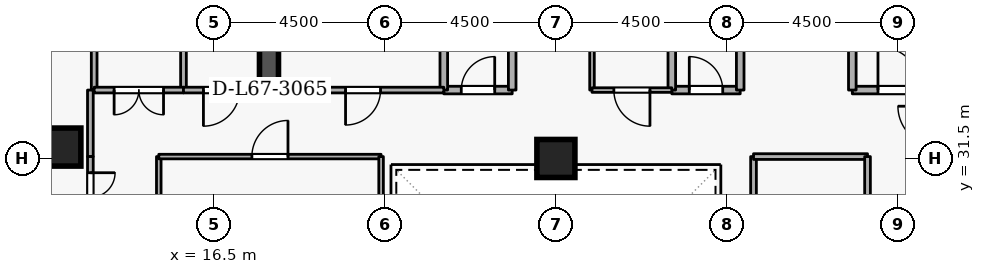
"""IFC4 building model, lengths in metres.
Left out: names, types, materials, properties, quantities, classifications, styles, units other than length and angle.
Written with IfcOpenShell. Run it as: python <this file> out.ifc"""

import sys

from ifc_helpers import new_model, si_unit, direction, frame, frame_2d, origin, origin_2d, place, context, subcontext, project, spatial, rectangle, extrude, element, fill, save


model = new_model("IFC4")
c1 = context("Model", 3, precision=1e-05, world=origin(), true_north=direction((0.0, 1.0)))
c2 = subcontext(c1, "Body", "Model", "MODEL_VIEW")
j1 = project(units=[si_unit("LENGTHUNIT", "METRE"), si_unit("PLANEANGLEUNIT", "RADIAN")], contexts=[c1])
p1 = place(None, origin())
s1 = spatial("IfcSite", under=j1, at=p1, CompositionType="ELEMENT")
p2 = place(p1, origin())
s2 = spatial("IfcBuilding", under=s1, at=p2, CompositionType="ELEMENT")
p3 = place(p2, frame((0.0, 0.0, 251.1)))
s3 = spatial("IfcBuildingStorey", under=s2, at=p3, CompositionType="ELEMENT", Elevation=251.1)
p4 = place(p3, frame((17.95, 33.1, 0.0), z_axis=(0.0, 0.0, 1.0), x_axis=(0.0, 1.0, 0.0)))
e1 = element("IfcWall", 1, at=p4, inside=s3, PredefinedType="SHEAR", context=c2, shape_type="SweptSolid", body=[
    extrude(rectangle(XDim=5.8, YDim=0.5, at=frame_2d((2.9, 0.0))), origin(), (0.0, 0.0, 1.0), 3.6),
])
for number, where, z_axis, x_axis in (
    (2, (12.5, 31.8, 0.0), (0.0, 0.0, 1.0), (1.0, 0.0, 0.0)),
    (3, (25.5, 31.5, 0.0), (0.0, 0.0, 1.0), (1.0, 0.0, 0.0)),
):
    element("IfcColumn", number, at=place(p3, frame(where, z_axis=z_axis, x_axis=x_axis)), inside=s3, PredefinedType="COLUMN", context=c2, shape_type="SweptSolid", body=[
        extrude(rectangle(XDim=1.0, YDim=1.0, at=origin_2d()), origin(), (0.0, 0.0, 1.0), 3.6),
    ])
p5 = place(p3, frame((33.3, 33.3, 0.0), z_axis=(0.0, 0.0, 1.0), x_axis=(1.0, 0.0, 0.0)))
e4 = element("IfcWall", 4, at=p5, inside=s3, PredefinedType="STANDARD", context=c2, shape_type="SweptSolid", body=[
    extrude(rectangle(XDim=2.5, YDim=0.2, at=frame_2d((1.25, 0.0))), origin(), (0.0, 0.0, 1.0), 3.32),
])
p6 = place(p5, frame((0.675, 0.0, 0.0)))
e5 = element("IfcOpeningElement", 5, at=p6, cuts=e4, PredefinedType="OPENING", context=c2, shape_type="SweptSolid", body=[
    extrude(rectangle(XDim=1.15, YDim=2.1, at=frame_2d((0.575, 1.05))), frame((0.0, 0.11, 0.0), z_axis=(0.0, -1.0, 0.0), x_axis=(1.0, 0.0, 0.0)), (0.0, 0.0, 1.0), 0.22),
])
p7 = place(p3, frame((33.3, 35.6, 0.0), z_axis=(0.0, 0.0, 1.0), x_axis=(0.0, -1.0, 0.0)))
e6 = element("IfcWall", 6, at=p7, inside=s3, PredefinedType="STANDARD", context=c2, shape_type="SweptSolid", body=[
    extrude(rectangle(XDim=2.3, YDim=0.2, at=frame_2d((1.15, 0.0))), origin(), (0.0, 0.0, 1.0), 2.525),
])
p8 = place(p3, frame((22.55, 33.3, 0.0), z_axis=(0.0, 0.0, 1.0), x_axis=(1.0, 0.0, 0.0)))
e7 = element("IfcWall", 7, at=p8, inside=s3, PredefinedType="STANDARD", context=c2, shape_type="SweptSolid", body=[
    extrude(rectangle(XDim=1.8, YDim=0.2, at=frame_2d((0.9, 0.0))), origin(), (0.0, 0.0, 1.0), 3.32),
])
p9 = place(p8, frame((0.46, 0.0, 0.0)))
e8 = element("IfcOpeningElement", 8, at=p9, cuts=e7, PredefinedType="OPENING", context=c2, shape_type="SweptSolid", body=[
    extrude(rectangle(XDim=0.88, YDim=2.04, at=frame_2d((0.44, 1.02))), frame((0.0, 0.11, 0.0), z_axis=(0.0, -1.0, 0.0), x_axis=(1.0, 0.0, 0.0)), (0.0, 0.0, 1.0), 0.22),
])
for number, where, z_axis, x_axis in (
    (9, (24.35, 33.3, 0.0), (0.0, 0.0, 1.0), (0.0, 1.0, 0.0)),
    (10, (22.55, 35.35, 0.0), (0.0, 0.0, 1.0), (0.0, -1.0, 0.0)),
):
    element("IfcWall", number, at=place(p3, frame(where, z_axis=z_axis, x_axis=x_axis)), inside=s3, PredefinedType="STANDARD", context=c2, shape_type="SweptSolid", body=[
        extrude(rectangle(XDim=2.05, YDim=0.2, at=frame_2d((1.025, 0.0))), origin(), (0.0, 0.0, 1.0), 3.32),
    ])
p10 = place(p3, frame((28.55, 33.3, 0.0), z_axis=(0.0, 0.0, 1.0), x_axis=(1.0, 0.0, 0.0)))
e11 = element("IfcWall", 11, at=p10, inside=s3, PredefinedType="STANDARD", context=c2, shape_type="SweptSolid", body=[
    extrude(rectangle(XDim=1.8, YDim=0.2, at=frame_2d((0.9, 0.0))), origin(), (0.0, 0.0, 1.0), 3.32),
])
p11 = place(p10, frame((0.46, 0.0, 0.0)))
e12 = element("IfcOpeningElement", 12, at=p11, cuts=e11, PredefinedType="OPENING", context=c2, shape_type="SweptSolid", body=[
    extrude(rectangle(XDim=0.88, YDim=2.04, at=frame_2d((0.44, 1.02))), frame((0.0, 0.11, 0.0), z_axis=(0.0, -1.0, 0.0), x_axis=(1.0, 0.0, 0.0)), (0.0, 0.0, 1.0), 0.22),
])
for number, where, z_axis, x_axis in (
    (13, (30.35, 33.3, 0.0), (0.0, 0.0, 1.0), (0.0, 1.0, 0.0)),
    (14, (28.55, 35.35, 0.0), (0.0, 0.0, 1.0), (0.0, -1.0, 0.0)),
):
    element("IfcWall", number, at=place(p3, frame(where, z_axis=z_axis, x_axis=x_axis)), inside=s3, PredefinedType="STANDARD", context=c2, shape_type="SweptSolid", body=[
        extrude(rectangle(XDim=2.05, YDim=0.2, at=frame_2d((1.025, 0.0))), origin(), (0.0, 0.0, 1.0), 3.32),
    ])
p12 = place(p3, frame((22.55, 33.3, 0.0), z_axis=(0.0, 0.0, 1.0), x_axis=(-1.0, 0.0, 0.0)))
e15 = element("IfcWall", 15, at=p12, inside=s3, PredefinedType="PARTITIONING", context=c2, shape_type="SweptSolid", body=[
    extrude(rectangle(XDim=4.25, YDim=0.15, at=frame_2d((2.125, 0.0))), origin(), (0.0, 0.0, 1.0), 3.32),
])
p13 = place(p12, frame((1.665, 0.0, 0.0)))
e16 = element("IfcOpeningElement", 16, at=p13, cuts=e15, PredefinedType="OPENING", context=c2, shape_type="SweptSolid", body=[
    extrude(rectangle(XDim=0.92, YDim=2.08, at=frame_2d((0.46, 1.04))), frame((0.0, 0.085, 0.0), z_axis=(0.0, -1.0, 0.0), x_axis=(1.0, 0.0, 0.0)), (0.0, 0.0, 1.0), 0.17),
])
p14 = place(p3, frame((26.45, 33.3, 0.0), z_axis=(0.0, 0.0, 1.0), x_axis=(0.0, 1.0, 0.0)))
e17 = element("IfcWall", 17, at=p14, inside=s3, PredefinedType="PARTITIONING", context=c2, shape_type="SweptSolid", body=[
    extrude(rectangle(XDim=2.05, YDim=0.12, at=frame_2d((1.025, 0.0))), origin(), (0.0, 0.0, 1.0), 3.32),
])
p15 = place(p3, frame((28.55, 33.3, 0.0), z_axis=(0.0, 0.0, 1.0), x_axis=(-1.0, 0.0, 0.0)))
e18 = element("IfcWall", 18, at=p15, inside=s3, PredefinedType="PARTITIONING", context=c2, shape_type="SweptSolid", body=[
    extrude(rectangle(XDim=2.1, YDim=0.12, at=frame_2d((1.05, 0.0))), origin(), (0.0, 0.0, 1.0), 3.32),
])
p16 = place(p15, frame((0.575, 0.0, 0.0)))
e19 = element("IfcOpeningElement", 19, at=p16, cuts=e18, PredefinedType="OPENING", context=c2, shape_type="SweptSolid", body=[
    extrude(rectangle(XDim=0.95, YDim=2.1, at=frame_2d((0.475, 1.05))), frame((0.0, 0.07, 0.0), z_axis=(0.0, -1.0, 0.0), x_axis=(1.0, 0.0, 0.0)), (0.0, 0.0, 1.0), 0.14),
])
for number, where, z_axis, x_axis in (
    (20, (13.35, 33.3, 0.0), (0.0, 0.0, 1.0), (0.0, 1.0, 0.0)),
    (21, (15.7, 44.72, 0.0), (0.0, 0.0, 1.0), (0.0, -1.0, 0.0)),
):
    element("IfcWall", number, at=place(p3, frame(where, z_axis=z_axis, x_axis=x_axis)), inside=s3, PredefinedType="PARTITIONING", context=c2, shape_type="SweptSolid", body=[
        extrude(rectangle(XDim=11.42, YDim=0.15, at=frame_2d((5.71, 0.0))), origin(), (0.0, 0.0, 1.0), 3.32),
    ])
p17 = place(p3, frame((15.7, 33.3, 0.0), z_axis=(0.0, 0.0, 1.0), x_axis=(-1.0, 0.0, 0.0)))
e22 = element("IfcWall", 22, at=p17, inside=s3, PredefinedType="PARTITIONING", context=c2, shape_type="SweptSolid", body=[
    extrude(rectangle(XDim=2.35, YDim=0.15, at=frame_2d((1.175, 0.0))), origin(), (0.0, 0.0, 1.0), 3.32),
])
p18 = place(p17, frame((0.525, 0.0, 0.0)))
e23 = element("IfcOpeningElement", 23, at=p18, cuts=e22, PredefinedType="OPENING", context=c2, shape_type="SweptSolid", body=[
    extrude(rectangle(XDim=1.3, YDim=2.12, at=frame_2d((0.65, 1.06))), frame((0.0, 0.085, 0.0), z_axis=(0.0, -1.0, 0.0), x_axis=(1.0, 0.0, 0.0)), (0.0, 0.0, 1.0), 0.17),
])
p19 = place(p3, frame((17.7, 33.3, 0.0), z_axis=(0.0, 0.0, 1.0), x_axis=(-1.0, 0.0, 0.0)))
e24 = element("IfcWall", 24, at=p19, inside=s3, PredefinedType="PARTITIONING", context=c2, shape_type="SweptSolid", body=[
    extrude(rectangle(XDim=2.0, YDim=0.15, at=frame_2d((1.0, 0.0))), origin(), (0.0, 0.0, 1.0), 3.32),
])
p20 = place(p19, frame((0.525, 0.0, 0.0)))
e25 = element("IfcOpeningElement", 25, at=p20, cuts=e24, PredefinedType="OPENING", context=c2, shape_type="SweptSolid", body=[
    extrude(rectangle(XDim=0.95, YDim=2.1, at=frame_2d((0.475, 1.05))), frame((0.0, 0.085, 0.0), z_axis=(0.0, -1.0, 0.0), x_axis=(1.0, 0.0, 0.0)), (0.0, 0.0, 1.0), 0.17),
])
p21 = place(p3, frame((13.25, 33.3, 0.0), z_axis=(0.0, 0.0, 1.0), x_axis=(0.0, -1.0, 0.0)))
e26 = element("IfcWall", 26, at=p21, inside=s3, PredefinedType="PARTITIONING", context=c2, shape_type="SweptSolid", body=[
    extrude(rectangle(XDim=1.75, YDim=0.15, at=frame_2d((0.875, 0.0))), origin(), (0.0, 0.0, 1.0), 3.32),
])
p22 = place(p3, frame((13.25, 31.55, 0.0), z_axis=(0.0, 0.0, 1.0), x_axis=(0.0, -1.0, 0.0)))
e27 = element("IfcWall", 27, at=p22, inside=s3, PredefinedType="PARTITIONING", context=c2, shape_type="SweptSolid", body=[
    extrude(rectangle(XDim=2.15, YDim=0.15, at=frame_2d((1.075, 0.0))), origin(), (0.0, 0.0, 1.0), 3.32),
])
p23 = place(p22, frame((0.425, 0.0, 0.0)))
e28 = element("IfcOpeningElement", 28, at=p23, cuts=e27, PredefinedType="OPENING", context=c2, shape_type="SweptSolid", body=[
    extrude(rectangle(XDim=1.3, YDim=2.12, at=frame_2d((0.65, 1.06))), frame((0.0, 0.085, 0.0), z_axis=(0.0, -1.0, 0.0), x_axis=(1.0, 0.0, 0.0)), (0.0, 0.0, 1.0), 0.17),
])
p24 = place(p3, frame((15.05, 26.2, 0.0), z_axis=(0.0, 0.0, 1.0), x_axis=(0.0, 1.0, 0.0)))
e29 = element("IfcWall", 29, at=p24, inside=s3, PredefinedType="PARTITIONING", context=c2, shape_type="SweptSolid", body=[
    extrude(rectangle(XDim=5.35, YDim=0.12, at=frame_2d((2.675, 0.0))), origin(), (0.0, 0.0, 1.0), 3.32),
])
p25 = place(p3, frame((15.05, 31.55, 0.0), z_axis=(0.0, 0.0, 1.0), x_axis=(1.0, 0.0, 0.0)))
e30 = element("IfcWall", 30, at=p25, inside=s3, PredefinedType="PARTITIONING", context=c2, shape_type="SweptSolid", body=[
    extrude(rectangle(XDim=5.85, YDim=0.12, at=frame_2d((2.925, 0.0))), origin(), (0.0, 0.0, 1.0), 3.32),
])
p26 = place(p25, frame((2.45, 0.0, 0.0)))
e31 = element("IfcOpeningElement", 31, at=p26, cuts=e30, PredefinedType="OPENING", context=c2, shape_type="SweptSolid", body=[
    extrude(rectangle(XDim=0.95, YDim=2.1, at=frame_2d((0.475, 1.05))), frame((0.0, 0.07, 0.0), z_axis=(0.0, -1.0, 0.0), x_axis=(1.0, 0.0, 0.0)), (0.0, 0.0, 1.0), 0.14),
])
p27 = place(p3, frame((20.9, 31.55, 0.0), z_axis=(0.0, 0.0, 1.0), x_axis=(0.0, -1.0, 0.0)))
e32 = element("IfcWall", 32, at=p27, inside=s3, PredefinedType="PARTITIONING", context=c2, shape_type="SweptSolid", body=[
    extrude(rectangle(XDim=5.35, YDim=0.12, at=frame_2d((2.675, 0.0))), origin(), (0.0, 0.0, 1.0), 3.32),
])
p28 = place(p3, frame((30.7, 27.55, 0.0), z_axis=(0.0, 0.0, 1.0), x_axis=(0.0, 1.0, 0.0)))
e33 = element("IfcWall", 33, at=p28, inside=s3, PredefinedType="PARTITIONING", context=c2, shape_type="SweptSolid", body=[
    extrude(rectangle(XDim=4.0, YDim=0.15, at=frame_2d((2.0, 0.0))), origin(), (0.0, 0.0, 1.0), 3.32),
])
p29 = place(p3, frame((30.7, 31.55, 0.0), z_axis=(0.0, 0.0, 1.0), x_axis=(1.0, 0.0, 0.0)))
e34 = element("IfcWall", 34, at=p29, inside=s3, PredefinedType="PARTITIONING", context=c2, shape_type="SweptSolid", body=[
    extrude(rectangle(XDim=3.0, YDim=0.15, at=frame_2d((1.5, 0.0))), origin(), (0.0, 0.0, 1.0), 3.32),
])
p30 = place(p3, frame((33.7, 31.55, 0.0), z_axis=(0.0, 0.0, 1.0), x_axis=(0.0, -1.0, 0.0)))
e35 = element("IfcWall", 35, at=p30, inside=s3, PredefinedType="PARTITIONING", context=c2, shape_type="SweptSolid", body=[
    extrude(rectangle(XDim=4.0, YDim=0.15, at=frame_2d((2.0, 0.0))), origin(), (0.0, 0.0, 1.0), 3.32),
])
p31 = place(p30, frame((1.35, 0.0, 0.0)))
e36 = element("IfcOpeningElement", 36, at=p31, cuts=e35, PredefinedType="OPENING", context=c2, shape_type="SweptSolid", body=[
    extrude(rectangle(XDim=1.3, YDim=2.12, at=frame_2d((0.65, 1.06))), frame((0.0, 0.085, 0.0), z_axis=(0.0, -1.0, 0.0), x_axis=(1.0, 0.0, 0.0)), (0.0, 0.0, 1.0), 0.17),
])
p32 = place(p6, origin())
e37 = element("IfcDoor", 37, at=p32, inside=s3, OperationType="SINGLE_SWING_LEFT", PredefinedType="DOOR", context=c2, shape_type="SweptSolid", body=[
    extrude(rectangle(XDim=1.15, YDim=2.1, at=frame_2d((0.575, 1.05))), frame((0.0, 0.025, 0.0), z_axis=(0.0, -1.0, 0.0), x_axis=(1.0, 0.0, 0.0)), (0.0, 0.0, 1.0), 0.05),
])
fill(e5, e37)
p33 = place(p9, origin())
e38 = element("IfcDoor", 38, at=p33, inside=s3, OperationType="SINGLE_SWING_RIGHT", PredefinedType="DOOR", context=c2, shape_type="SweptSolid", body=[
    extrude(rectangle(XDim=0.88, YDim=2.04, at=frame_2d((0.44, 1.02))), frame((0.0, 0.025, 0.0), z_axis=(0.0, -1.0, 0.0), x_axis=(1.0, 0.0, 0.0)), (0.0, 0.0, 1.0), 0.05),
])
fill(e8, e38)
p34 = place(p11, origin())
e39 = element("IfcDoor", 39, at=p34, inside=s3, OperationType="SINGLE_SWING_LEFT", PredefinedType="DOOR", context=c2, shape_type="SweptSolid", body=[
    extrude(rectangle(XDim=0.88, YDim=2.04, at=frame_2d((0.44, 1.02))), frame((0.0, 0.025, 0.0), z_axis=(0.0, -1.0, 0.0), x_axis=(1.0, 0.0, 0.0)), (0.0, 0.0, 1.0), 0.05),
])
fill(e12, e39)
p35 = place(p13, origin())
e40 = element("IfcDoor", 40, at=p35, inside=s3, OperationType="SINGLE_SWING_RIGHT", PredefinedType="DOOR", context=c2, shape_type="SweptSolid", body=[
    extrude(rectangle(XDim=0.92, YDim=2.08, at=frame_2d((0.46, 1.04))), frame((0.0, 0.025, 0.0), z_axis=(0.0, -1.0, 0.0), x_axis=(1.0, 0.0, 0.0)), (0.0, 0.0, 1.0), 0.05),
])
fill(e16, e40)
p36 = place(p16, origin())
e41 = element("IfcDoor", 41, at=p36, inside=s3, OperationType="SINGLE_SWING_LEFT", PredefinedType="DOOR", context=c2, shape_type="SweptSolid", body=[
    extrude(rectangle(XDim=0.95, YDim=2.1, at=frame_2d((0.475, 1.05))), frame((0.0, 0.025, 0.0), z_axis=(0.0, -1.0, 0.0), x_axis=(1.0, 0.0, 0.0)), (0.0, 0.0, 1.0), 0.05),
])
fill(e19, e41)
p37 = place(p18, origin())
e42 = element("IfcDoor", 42, at=p37, inside=s3, OperationType="DOUBLE_DOOR_SINGLE_SWING", PredefinedType="DOOR", context=c2, shape_type="SweptSolid", body=[
    extrude(rectangle(XDim=1.3, YDim=2.12, at=frame_2d((0.65, 1.06))), frame((0.0, 0.025, 0.0), z_axis=(0.0, -1.0, 0.0), x_axis=(1.0, 0.0, 0.0)), (0.0, 0.0, 1.0), 0.05),
])
fill(e23, e42)
p38 = place(p20, origin())
e43 = element("IfcDoor", 43, at=p38, inside=s3, OperationType="SINGLE_SWING_RIGHT", PredefinedType="DOOR", context=c2, shape_type="SweptSolid", body=[
    extrude(rectangle(XDim=0.95, YDim=2.1, at=frame_2d((0.475, 1.05))), frame((0.0, 0.025, 0.0), z_axis=(0.0, -1.0, 0.0), x_axis=(1.0, 0.0, 0.0)), (0.0, 0.0, 1.0), 0.05),
])
fill(e25, e43)
p39 = place(p23, origin())
e44 = element("IfcDoor", 44, at=p39, inside=s3, OperationType="DOUBLE_DOOR_SINGLE_SWING", PredefinedType="DOOR", context=c2, shape_type="SweptSolid", body=[
    extrude(rectangle(XDim=1.3, YDim=2.12, at=frame_2d((0.65, 1.06))), frame((0.0, 0.025, 0.0), z_axis=(0.0, -1.0, 0.0), x_axis=(1.0, 0.0, 0.0)), (0.0, 0.0, 1.0), 0.05),
])
fill(e28, e44)
p40 = place(p26, origin())
e45 = element("IfcDoor", 45, at=p40, inside=s3, OperationType="SINGLE_SWING_RIGHT", PredefinedType="DOOR", context=c2, shape_type="SweptSolid", body=[
    extrude(rectangle(XDim=0.95, YDim=2.1, at=frame_2d((0.475, 1.05))), frame((0.0, 0.025, 0.0), z_axis=(0.0, -1.0, 0.0), x_axis=(1.0, 0.0, 0.0)), (0.0, 0.0, 1.0), 0.05),
])
fill(e31, e45)
save(model, sys.argv[1])
